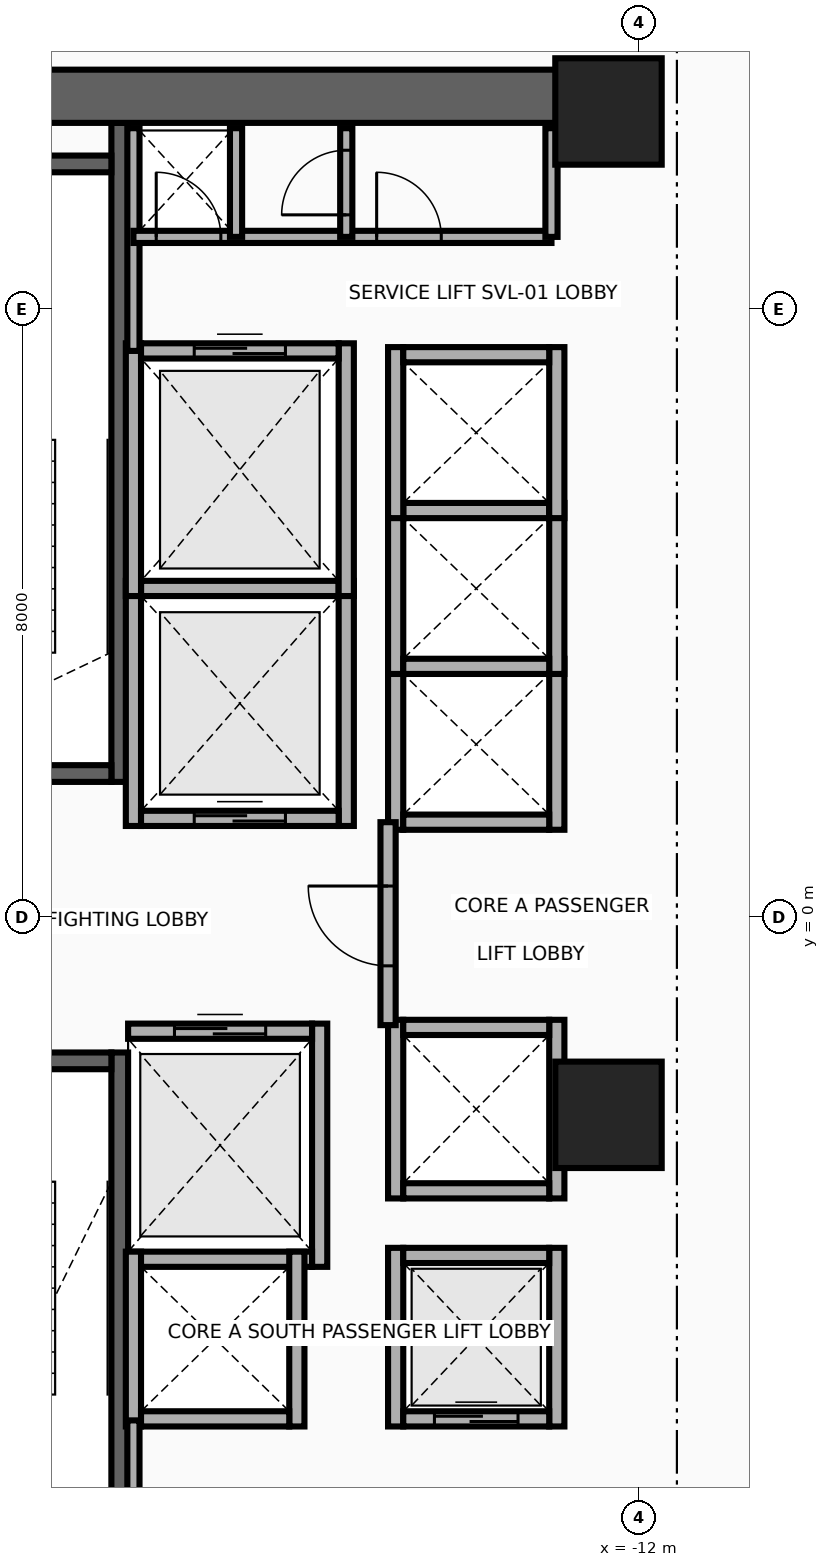
"""IFC4 building model, lengths in metres.
Left out: names, types, materials, properties, quantities, classifications, styles, units other than length and angle.
Written with IfcOpenShell. Run it as: python <this file> out.ifc"""

import sys

from ifc_helpers import new_model, si_unit, direction, frame, frame_2d, origin, origin_2d, place, context, subcontext, project, spatial, rectangle, extrude, source, transform, mapped, element, fill, save


model = new_model("IFC4")
c1 = context("Model", 3, precision=1e-05, world=origin(), true_north=direction((0.0, 1.0)))
c2 = subcontext(c1, "Body", "Model", "MODEL_VIEW")
j1 = project(units=[si_unit("LENGTHUNIT", "METRE"), si_unit("PLANEANGLEUNIT", "RADIAN")], contexts=[c1])
p1 = place(None, origin())
s1 = spatial("IfcSite", under=j1, at=p1, CompositionType="ELEMENT")
p2 = place(p1, origin())
s2 = spatial("IfcBuilding", under=s1, at=p2, CompositionType="ELEMENT")
p3 = place(p2, frame((0.0, 0.0, 74.1)))
s3 = spatial("IfcBuildingStorey", under=s2, at=p3, CompositionType="ELEMENT", Elevation=74.1)
p4 = place(p3, frame((-18.83, 1.78, 0.0), z_axis=(0.0, 0.0, 1.0), x_axis=(0.0, 1.0, 0.0)))
e1 = element("IfcWall", 1, at=p4, inside=s3, PredefinedType="SHEAR", context=c2, shape_type="SweptSolid", body=[
    extrude(rectangle(XDim=8.67, YDim=0.22, at=frame_2d((4.335, 0.0))), origin(), (0.0, 0.0, 1.0), 3.46),
])
p5 = place(p3, frame((-22.05, 1.89, 0.0), z_axis=(0.0, 0.0, 1.0), x_axis=(1.0, 0.0, 0.0)))
e2 = element("IfcWall", 2, at=p5, inside=s3, PredefinedType="SHEAR", context=c2, shape_type="SweptSolid", body=[
    extrude(rectangle(XDim=3.11, YDim=0.22, at=frame_2d((1.555, 0.0))), origin(), (0.0, 0.0, 1.0), 3.46),
])
p6 = place(p5, frame((1.0, 0.0, 0.0)))
e3 = element("IfcOpeningElement", 3, at=p6, cuts=e2, PredefinedType="OPENING", context=c2, shape_type="SweptSolid", body=[
    extrude(rectangle(XDim=1.1, YDim=2.15, at=frame_2d((0.55, 1.075))), frame((0.0, 0.125, 0.0), z_axis=(0.0, -1.0, 0.0), x_axis=(1.0, 0.0, 0.0)), (0.0, 0.0, 1.0), 0.25),
])
p7 = place(p3, frame((-22.05, 9.91, 0.0), z_axis=(0.0, 0.0, 1.0), x_axis=(1.0, 0.0, 0.0)))
e4 = element("IfcWall", 4, at=p7, inside=s3, PredefinedType="SHEAR", context=c2, shape_type="SweptSolid", body=[
    extrude(rectangle(XDim=3.11, YDim=0.22, at=frame_2d((1.555, 0.0))), origin(), (0.0, 0.0, 1.0), 3.46),
])
p8 = place(p3, frame((-18.83, -10.45, 0.0), z_axis=(0.0, 0.0, 1.0), x_axis=(0.0, 1.0, 0.0)))
e5 = element("IfcWall", 5, at=p8, inside=s3, PredefinedType="SHEAR", context=c2, shape_type="SweptSolid", body=[
    extrude(rectangle(XDim=8.67, YDim=0.22, at=frame_2d((4.335, 0.0))), origin(), (0.0, 0.0, 1.0), 3.46),
])
p9 = place(p3, frame((-22.05, -1.89, 0.0), z_axis=(0.0, 0.0, 1.0), x_axis=(1.0, 0.0, 0.0)))
e6 = element("IfcWall", 6, at=p9, inside=s3, PredefinedType="SHEAR", context=c2, shape_type="SweptSolid", body=[
    extrude(rectangle(XDim=3.11, YDim=0.22, at=frame_2d((1.555, 0.0))), origin(), (0.0, 0.0, 1.0), 3.46),
])
p10 = place(p9, frame((1.0, 0.0, 0.0)))
e7 = element("IfcOpeningElement", 7, at=p10, cuts=e6, PredefinedType="OPENING", context=c2, shape_type="SweptSolid", body=[
    extrude(rectangle(XDim=1.1, YDim=2.15, at=frame_2d((0.55, 1.075))), frame((0.0, 0.125, 0.0), z_axis=(0.0, -1.0, 0.0), x_axis=(1.0, 0.0, 0.0)), (0.0, 0.0, 1.0), 0.25),
])
p11 = place(p3, frame((-22.65, 10.8, 0.0), z_axis=(0.0, 0.0, 1.0), x_axis=(1.0, 0.0, 0.0)))
e8 = element("IfcWall", 8, at=p11, inside=s3, PredefinedType="SHEAR", context=c2, shape_type="SweptSolid", body=[
    extrude(rectangle(XDim=10.25, YDim=0.7, at=frame_2d((5.125, 0.0))), origin(), (0.0, 0.0, 1.0), 3.46),
])
m1 = source(origin(), c2, "Body", "SweptSolid", [
    extrude(rectangle(XDim=1.4, YDim=1.4, at=origin_2d()), origin(), (0.0, 0.0, 1.0), 3.7),
])
for number, where, z_axis, x_axis in (
    (9, (-12.4, -2.6, 0.0), (0.0, 0.0, 1.0), (1.0, 0.0, 0.0)),
    (10, (-12.4, 10.6, 0.0), (0.0, 0.0, 1.0), (1.0, 0.0, 0.0)),
):
    element("IfcColumn", number, at=place(p3, frame(where, z_axis=z_axis, x_axis=x_axis)), inside=s3, PredefinedType="COLUMN", context=c2, shape_type="MappedRepresentation", body=[
        mapped(m1, transform((0.0, 0.0, 0.0), x_axis=(1.0, 0.0, 0.0), y_axis=(0.0, 1.0, 0.0), z_axis=(0.0, 0.0, 1.0), scale=1.0)),
    ])
for number, where, z_axis, x_axis in (
    (11, (-18.65, 1.2, 0.0), (0.0, 0.0, 1.0), (0.0, 1.0, 0.0)),
    (12, (-15.85, 1.2, 0.0), (0.0, 0.0, 1.0), (0.0, 1.0, 0.0)),
):
    element("IfcWall", number, at=place(p3, frame(where, z_axis=z_axis, x_axis=x_axis)), inside=s3, PredefinedType="MOVABLE", context=c2, shape_type="SweptSolid", body=[
        extrude(rectangle(XDim=3.225, YDim=0.2, at=frame_2d((1.613, 0.0))), origin(), (0.0, 0.0, 1.0), 3.46),
    ])
p12 = place(p3, frame((-18.55, 1.3, 0.0), z_axis=(0.0, 0.0, 1.0), x_axis=(1.0, 0.0, 0.0)))
e13 = element("IfcWall", 13, at=p12, inside=s3, PredefinedType="MOVABLE", context=c2, shape_type="SweptSolid", body=[
    extrude(rectangle(XDim=2.6, YDim=0.2, at=frame_2d((1.3, 0.0))), origin(), (0.0, 0.0, 1.0), 3.46),
])
p13 = place(p12, frame((0.7, 0.0, 0.0)))
e14 = element("IfcOpeningElement", 14, at=p13, cuts=e13, PredefinedType="OPENING", context=c2, shape_type="SweptSolid", body=[
    extrude(rectangle(XDim=1.2, YDim=2.1, at=frame_2d((0.6, 1.05))), frame((0.0, 0.115, 0.0), z_axis=(0.0, -1.0, 0.0), x_axis=(1.0, 0.0, 0.0)), (0.0, 0.0, 1.0), 0.23),
])
p14 = place(p3, frame((-18.55, 4.325, 0.0), z_axis=(0.0, 0.0, 1.0), x_axis=(1.0, 0.0, 0.0)))
e15 = element("IfcWall", 15, at=p14, inside=s3, PredefinedType="MOVABLE", context=c2, shape_type="SweptSolid", body=[
    extrude(rectangle(XDim=2.6, YDim=0.2, at=frame_2d((1.3, 0.0))), origin(), (0.0, 0.0, 1.0), 3.46),
])
p15 = place(p3, frame((-16.2, -4.6, 0.0), z_axis=(0.0, 0.0, 1.0), x_axis=(0.0, 1.0, 0.0)))
e16 = element("IfcWall", 16, at=p15, inside=s3, PredefinedType="MOVABLE", context=c2, shape_type="SweptSolid", body=[
    extrude(rectangle(XDim=3.2, YDim=0.2, at=frame_2d((1.6, 0.0))), origin(), (0.0, 0.0, 1.0), 3.46),
])
p16 = place(p3, frame((-18.72, -4.5, 0.0), z_axis=(0.0, 0.0, 1.0), x_axis=(1.0, 0.0, 0.0)))
e17 = element("IfcWall", 17, at=p16, inside=s3, PredefinedType="MOVABLE", context=c2, shape_type="SweptSolid", body=[
    extrude(rectangle(XDim=2.42, YDim=0.2, at=frame_2d((1.21, 0.0))), origin(), (0.0, 0.0, 1.0), 3.46),
])
p17 = place(p3, frame((-18.72, -1.5, 0.0), z_axis=(0.0, 0.0, 1.0), x_axis=(1.0, 0.0, 0.0)))
e18 = element("IfcWall", 18, at=p17, inside=s3, PredefinedType="MOVABLE", context=c2, shape_type="SweptSolid", body=[
    extrude(rectangle(XDim=2.42, YDim=0.2, at=frame_2d((1.21, 0.0))), origin(), (0.0, 0.0, 1.0), 3.46),
])
p18 = place(p17, frame((0.61, 0.0, 0.0)))
e19 = element("IfcOpeningElement", 19, at=p18, cuts=e18, PredefinedType="OPENING", context=c2, shape_type="SweptSolid", body=[
    extrude(rectangle(XDim=1.2, YDim=2.1, at=frame_2d((0.6, 1.05))), frame((0.0, 0.115, 0.0), z_axis=(0.0, -1.0, 0.0), x_axis=(1.0, 0.0, 0.0)), (0.0, 0.0, 1.0), 0.23),
])
for number, where, z_axis, x_axis in (
    (20, (-18.65, 4.225, 0.0), (0.0, 0.0, 1.0), (0.0, 1.0, 0.0)),
    (21, (-15.85, 4.225, 0.0), (0.0, 0.0, 1.0), (0.0, 1.0, 0.0)),
):
    element("IfcWall", number, at=place(p3, frame(where, z_axis=z_axis, x_axis=x_axis)), inside=s3, PredefinedType="MOVABLE", context=c2, shape_type="SweptSolid", body=[
        extrude(rectangle(XDim=3.325, YDim=0.2, at=frame_2d((1.663, 0.0))), origin(), (0.0, 0.0, 1.0), 3.46),
    ])
p19 = place(p3, frame((-18.55, 7.45, 0.0), z_axis=(0.0, 0.0, 1.0), x_axis=(1.0, 0.0, 0.0)))
e22 = element("IfcWall", 22, at=p19, inside=s3, PredefinedType="MOVABLE", context=c2, shape_type="SweptSolid", body=[
    extrude(rectangle(XDim=2.6, YDim=0.2, at=frame_2d((1.3, 0.0))), origin(), (0.0, 0.0, 1.0), 3.46),
])
p20 = place(p19, frame((0.7, 0.0, 0.0)))
e23 = element("IfcOpeningElement", 23, at=p20, cuts=e22, PredefinedType="OPENING", context=c2, shape_type="SweptSolid", body=[
    extrude(rectangle(XDim=1.2, YDim=2.1, at=frame_2d((0.6, 1.05))), frame((0.0, 0.115, 0.0), z_axis=(0.0, -1.0, 0.0), x_axis=(1.0, 0.0, 0.0)), (0.0, 0.0, 1.0), 0.23),
])
for number, where, z_axis, x_axis in (
    (24, (-15.2, -6.7, 0.0), (0.0, 0.0, 1.0), (0.0, 1.0, 0.0)),
    (25, (-13.08, -6.7, 0.0), (0.0, 0.0, 1.0), (0.0, 1.0, 0.0)),
):
    element("IfcWall", number, at=place(p3, frame(where, z_axis=z_axis, x_axis=x_axis)), inside=s3, PredefinedType="MOVABLE", context=c2, shape_type="SweptSolid", body=[
        extrude(rectangle(XDim=2.35, YDim=0.2, at=frame_2d((1.175, 0.0))), origin(), (0.0, 0.0, 1.0), 3.46),
    ])
p21 = place(p3, frame((-15.1, -6.6, 0.0), z_axis=(0.0, 0.0, 1.0), x_axis=(1.0, 0.0, 0.0)))
e26 = element("IfcWall", 26, at=p21, inside=s3, PredefinedType="MOVABLE", context=c2, shape_type="SweptSolid", body=[
    extrude(rectangle(XDim=1.92, YDim=0.2, at=frame_2d((0.96, 0.0))), origin(), (0.0, 0.0, 1.0), 3.46),
])
p22 = place(p21, frame((0.41, 0.0, 0.0)))
e27 = element("IfcOpeningElement", 27, at=p22, cuts=e26, PredefinedType="OPENING", context=c2, shape_type="SweptSolid", body=[
    extrude(rectangle(XDim=1.1, YDim=2.1, at=frame_2d((0.55, 1.05))), frame((0.0, 0.115, 0.0), z_axis=(0.0, -1.0, 0.0), x_axis=(1.0, 0.0, 0.0)), (0.0, 0.0, 1.0), 0.23),
])
p23 = place(p3, frame((-15.1, -4.45, 0.0), z_axis=(0.0, 0.0, 1.0), x_axis=(1.0, 0.0, 0.0)))
e28 = element("IfcWall", 28, at=p23, inside=s3, PredefinedType="MOVABLE", context=c2, shape_type="SweptSolid", body=[
    extrude(rectangle(XDim=1.92, YDim=0.2, at=frame_2d((0.96, 0.0))), origin(), (0.0, 0.0, 1.0), 3.46),
])
for number, where, z_axis, x_axis in (
    (29, (-15.2, 1.15, 0.0), (0.0, 0.0, 1.0), (0.0, 1.0, 0.0)),
    (30, (-13.08, 1.15, 0.0), (0.0, 0.0, 1.0), (0.0, 1.0, 0.0)),
):
    element("IfcWall", number, at=place(p3, frame(where, z_axis=z_axis, x_axis=x_axis)), inside=s3, PredefinedType="MOVABLE", context=c2, shape_type="SweptSolid", body=[
        extrude(rectangle(XDim=2.25, YDim=0.2, at=frame_2d((1.125, 0.0))), origin(), (0.0, 0.0, 1.0), 3.46),
    ])
p24 = place(p3, frame((-15.1, 1.25, 0.0), z_axis=(0.0, 0.0, 1.0), x_axis=(1.0, 0.0, 0.0)))
e31 = element("IfcWall", 31, at=p24, inside=s3, PredefinedType="MOVABLE", context=c2, shape_type="SweptSolid", body=[
    extrude(rectangle(XDim=1.92, YDim=0.2, at=frame_2d((0.96, 0.0))), origin(), (0.0, 0.0, 1.0), 3.46),
])
for number, where, z_axis, x_axis in (
    (32, (-15.2, 3.2, 0.0), (0.0, 0.0, 1.0), (0.0, 1.0, 0.0)),
    (33, (-13.08, 3.2, 0.0), (0.0, 0.0, 1.0), (0.0, 1.0, 0.0)),
):
    element("IfcWall", number, at=place(p3, frame(where, z_axis=z_axis, x_axis=x_axis)), inside=s3, PredefinedType="MOVABLE", context=c2, shape_type="SweptSolid", body=[
        extrude(rectangle(XDim=2.25, YDim=0.2, at=frame_2d((1.125, 0.0))), origin(), (0.0, 0.0, 1.0), 3.46),
    ])
for number, where, z_axis, x_axis in (
    (34, (-15.1, 3.3, 0.0), (0.0, 0.0, 1.0), (1.0, 0.0, 0.0)),
    (35, (-15.1, 5.35, 0.0), (0.0, 0.0, 1.0), (1.0, 0.0, 0.0)),
):
    element("IfcWall", number, at=place(p3, frame(where, z_axis=z_axis, x_axis=x_axis)), inside=s3, PredefinedType="MOVABLE", context=c2, shape_type="SweptSolid", body=[
        extrude(rectangle(XDim=1.92, YDim=0.2, at=frame_2d((0.96, 0.0))), origin(), (0.0, 0.0, 1.0), 3.46),
    ])
for number, where, z_axis, x_axis in (
    (36, (-15.2, 5.25, 0.0), (0.0, 0.0, 1.0), (0.0, 1.0, 0.0)),
    (37, (-13.08, 5.25, 0.0), (0.0, 0.0, 1.0), (0.0, 1.0, 0.0)),
):
    element("IfcWall", number, at=place(p3, frame(where, z_axis=z_axis, x_axis=x_axis)), inside=s3, PredefinedType="MOVABLE", context=c2, shape_type="SweptSolid", body=[
        extrude(rectangle(XDim=2.25, YDim=0.2, at=frame_2d((1.125, 0.0))), origin(), (0.0, 0.0, 1.0), 3.46),
    ])
p25 = place(p3, frame((-15.1, 7.4, 0.0), z_axis=(0.0, 0.0, 1.0), x_axis=(1.0, 0.0, 0.0)))
e38 = element("IfcWall", 38, at=p25, inside=s3, PredefinedType="MOVABLE", context=c2, shape_type="SweptSolid", body=[
    extrude(rectangle(XDim=1.92, YDim=0.2, at=frame_2d((0.96, 0.0))), origin(), (0.0, 0.0, 1.0), 3.46),
])
for number, where, z_axis, x_axis in (
    (39, (-18.65, -6.7, 0.0), (0.0, 0.0, 1.0), (0.0, 1.0, 0.0)),
    (40, (-16.5, -6.7, 0.0), (0.0, 0.0, 1.0), (0.0, 1.0, 0.0)),
):
    element("IfcWall", number, at=place(p3, frame(where, z_axis=z_axis, x_axis=x_axis)), inside=s3, PredefinedType="MOVABLE", context=c2, shape_type="SweptSolid", body=[
        extrude(rectangle(XDim=2.3, YDim=0.2, at=frame_2d((1.15, 0.0))), origin(), (0.0, 0.0, 1.0), 3.46),
    ])
p26 = place(p3, frame((-18.55, -6.6, 0.0), z_axis=(0.0, 0.0, 1.0), x_axis=(1.0, 0.0, 0.0)))
e41 = element("IfcWall", 41, at=p26, inside=s3, PredefinedType="MOVABLE", context=c2, shape_type="SweptSolid", body=[
    extrude(rectangle(XDim=1.95, YDim=0.2, at=frame_2d((0.975, 0.0))), origin(), (0.0, 0.0, 1.0), 3.46),
])
for number, where, z_axis, x_axis in (
    (42, (-15.2, -3.7, 0.0), (0.0, 0.0, 1.0), (0.0, 1.0, 0.0)),
    (43, (-13.08, -3.7, 0.0), (0.0, 0.0, 1.0), (0.0, 1.0, 0.0)),
):
    element("IfcWall", number, at=place(p3, frame(where, z_axis=z_axis, x_axis=x_axis)), inside=s3, PredefinedType="MOVABLE", context=c2, shape_type="SweptSolid", body=[
        extrude(rectangle(XDim=2.35, YDim=0.2, at=frame_2d((1.175, 0.0))), origin(), (0.0, 0.0, 1.0), 3.46),
    ])
for number, where, z_axis, x_axis in (
    (44, (-15.1, -3.6, 0.0), (0.0, 0.0, 1.0), (1.0, 0.0, 0.0)),
    (45, (-15.1, -1.45, 0.0), (0.0, 0.0, 1.0), (1.0, 0.0, 0.0)),
):
    element("IfcWall", number, at=place(p3, frame(where, z_axis=z_axis, x_axis=x_axis)), inside=s3, PredefinedType="MOVABLE", context=c2, shape_type="SweptSolid", body=[
        extrude(rectangle(XDim=1.92, YDim=0.2, at=frame_2d((0.96, 0.0))), origin(), (0.0, 0.0, 1.0), 3.46),
    ])
p27 = place(p3, frame((-15.3, -1.42, 0.0), z_axis=(0.0, 0.0, 1.0), x_axis=(0.0, 1.0, 0.0)))
e46 = element("IfcWall", 46, at=p27, inside=s3, PredefinedType="PARTITIONING", context=c2, shape_type="SweptSolid", body=[
    extrude(rectangle(XDim=2.67, YDim=0.2, at=frame_2d((1.335, 0.0))), origin(), (0.0, 0.0, 1.0), 3.46),
])
p28 = place(p27, frame((0.78, 0.0, 0.0)))
e47 = element("IfcOpeningElement", 47, at=p28, cuts=e46, PredefinedType="OPENING", context=c2, shape_type="SweptSolid", body=[
    extrude(rectangle(XDim=1.05, YDim=2.15, at=frame_2d((0.525, 1.075))), frame((0.0, 0.115, 0.0), z_axis=(0.0, -1.0, 0.0), x_axis=(1.0, 0.0, 0.0)), (0.0, 0.0, 1.0), 0.23),
])
p29 = place(p3, frame((-18.65, 7.45, 0.0), z_axis=(0.0, 0.0, 1.0), x_axis=(0.0, 1.0, 0.0)))
e48 = element("IfcWall", 48, at=p29, inside=s3, PredefinedType="PARTITIONING", context=c2, shape_type="SweptSolid", body=[
    extrude(rectangle(XDim=2.93, YDim=0.16, at=frame_2d((1.465, 0.0))), origin(), (0.0, 0.0, 1.0), 3.46),
])
p30 = place(p3, frame((-18.65, -8.18, 0.0), z_axis=(0.0, 0.0, 1.0), x_axis=(0.0, 1.0, 0.0)))
e49 = element("IfcWall", 49, at=p30, inside=s3, PredefinedType="PARTITIONING", context=c2, shape_type="SweptSolid", body=[
    extrude(rectangle(XDim=1.56, YDim=0.16, at=frame_2d((0.78, 0.0))), origin(), (0.0, 0.0, 1.0), 3.46),
])
p31 = place(p3, frame((-18.65, 8.95, 0.0), z_axis=(0.0, 0.0, 1.0), x_axis=(1.0, 0.0, 0.0)))
e50 = element("IfcWall", 50, at=p31, inside=s3, PredefinedType="PARTITIONING", context=c2, shape_type="SweptSolid", body=[
    extrude(rectangle(XDim=5.5, YDim=0.16, at=frame_2d((2.75, 0.0))), origin(), (0.0, 0.0, 1.0), 3.46),
])
p32 = place(p31, frame((0.3, 0.0, 0.0)))
e51 = element("IfcOpeningElement", 51, at=p32, cuts=e50, PredefinedType="OPENING", context=c2, shape_type="SweptSolid", body=[
    extrude(rectangle(XDim=0.85, YDim=2.05, at=frame_2d((0.425, 1.025))), frame((0.0, 0.095, 0.0), z_axis=(0.0, -1.0, 0.0), x_axis=(1.0, 0.0, 0.0)), (0.0, 0.0, 1.0), 0.19),
])
p33 = place(p31, frame((3.2, 0.0, 0.0)))
e52 = element("IfcOpeningElement", 52, at=p33, cuts=e50, PredefinedType="OPENING", context=c2, shape_type="SweptSolid", body=[
    extrude(rectangle(XDim=0.85, YDim=2.05, at=frame_2d((0.425, 1.025))), frame((0.0, 0.095, 0.0), z_axis=(0.0, -1.0, 0.0), x_axis=(1.0, 0.0, 0.0)), (0.0, 0.0, 1.0), 0.19),
])
for number, where, z_axis, x_axis in (
    (53, (-13.15, 8.95, 0.0), (0.0, 0.0, 1.0), (0.0, 1.0, 0.0)),
    (54, (-17.3, 8.95, 0.0), (0.0, 0.0, 1.0), (0.0, 1.0, 0.0)),
):
    element("IfcWall", number, at=place(p3, frame(where, z_axis=z_axis, x_axis=x_axis)), inside=s3, PredefinedType="PARTITIONING", context=c2, shape_type="SweptSolid", body=[
        extrude(rectangle(XDim=1.43, YDim=0.16, at=frame_2d((0.715, 0.0))), origin(), (0.0, 0.0, 1.0), 3.46),
    ])
p34 = place(p3, frame((-15.85, 8.95, 0.0), z_axis=(0.0, 0.0, 1.0), x_axis=(0.0, 1.0, 0.0)))
e55 = element("IfcWall", 55, at=p34, inside=s3, PredefinedType="PARTITIONING", context=c2, shape_type="SweptSolid", body=[
    extrude(rectangle(XDim=1.43, YDim=0.16, at=frame_2d((0.715, 0.0))), origin(), (0.0, 0.0, 1.0), 3.46),
])
p35 = place(p34, frame((0.29, 0.0, 0.0)))
e56 = element("IfcOpeningElement", 56, at=p35, cuts=e55, PredefinedType="OPENING", context=c2, shape_type="SweptSolid", body=[
    extrude(rectangle(XDim=0.85, YDim=2.05, at=frame_2d((0.425, 1.025))), frame((0.0, 0.095, 0.0), z_axis=(0.0, -1.0, 0.0), x_axis=(1.0, 0.0, 0.0)), (0.0, 0.0, 1.0), 0.19),
])
p36 = place(p13, origin())
e57 = element("IfcDoor", 57, at=p36, inside=s3, OperationType="DOUBLE_DOOR_SLIDING", PredefinedType="DOOR", context=c2, shape_type="SweptSolid", body=[
    extrude(rectangle(XDim=1.2, YDim=2.1, at=frame_2d((0.6, 1.05))), frame((0.0, 0.025, 0.0), z_axis=(0.0, -1.0, 0.0), x_axis=(1.0, 0.0, 0.0)), (0.0, 0.0, 1.0), 0.05),
])
fill(e14, e57)
p37 = place(p18, origin())
e58 = element("IfcDoor", 58, at=p37, inside=s3, OperationType="DOUBLE_DOOR_SLIDING", PredefinedType="DOOR", context=c2, shape_type="SweptSolid", body=[
    extrude(rectangle(XDim=1.2, YDim=2.1, at=frame_2d((0.6, 1.05))), frame((0.0, 0.025, 0.0), z_axis=(0.0, -1.0, 0.0), x_axis=(1.0, 0.0, 0.0)), (0.0, 0.0, 1.0), 0.05),
])
fill(e19, e58)
p38 = place(p20, origin())
e59 = element("IfcDoor", 59, at=p38, inside=s3, OperationType="DOUBLE_DOOR_SLIDING", PredefinedType="DOOR", context=c2, shape_type="SweptSolid", body=[
    extrude(rectangle(XDim=1.2, YDim=2.1, at=frame_2d((0.6, 1.05))), frame((0.0, 0.025, 0.0), z_axis=(0.0, -1.0, 0.0), x_axis=(1.0, 0.0, 0.0)), (0.0, 0.0, 1.0), 0.05),
])
fill(e23, e59)
p39 = place(p22, origin())
e60 = element("IfcDoor", 60, at=p39, inside=s3, OperationType="DOUBLE_DOOR_SLIDING", PredefinedType="DOOR", context=c2, shape_type="SweptSolid", body=[
    extrude(rectangle(XDim=1.1, YDim=2.1, at=frame_2d((0.55, 1.05))), frame((0.0, 0.025, 0.0), z_axis=(0.0, -1.0, 0.0), x_axis=(1.0, 0.0, 0.0)), (0.0, 0.0, 1.0), 0.05),
])
fill(e27, e60)
p40 = place(p28, origin())
e61 = element("IfcDoor", 61, at=p40, inside=s3, OperationType="SINGLE_SWING_RIGHT", PredefinedType="DOOR", context=c2, shape_type="SweptSolid", body=[
    extrude(rectangle(XDim=1.05, YDim=2.15, at=frame_2d((0.525, 1.075))), frame((0.0, 0.025, 0.0), z_axis=(0.0, -1.0, 0.0), x_axis=(1.0, 0.0, 0.0)), (0.0, 0.0, 1.0), 0.05),
])
fill(e47, e61)
p41 = place(p32, origin())
e62 = element("IfcDoor", 62, at=p41, inside=s3, OperationType="SINGLE_SWING_LEFT", PredefinedType="DOOR", context=c2, shape_type="SweptSolid", body=[
    extrude(rectangle(XDim=0.85, YDim=2.05, at=frame_2d((0.425, 1.025))), frame((0.0, 0.025, 0.0), z_axis=(0.0, -1.0, 0.0), x_axis=(1.0, 0.0, 0.0)), (0.0, 0.0, 1.0), 0.05),
])
fill(e51, e62)
p42 = place(p33, origin())
e63 = element("IfcDoor", 63, at=p42, inside=s3, OperationType="SINGLE_SWING_RIGHT", PredefinedType="DOOR", context=c2, shape_type="SweptSolid", body=[
    extrude(rectangle(XDim=0.85, YDim=2.05, at=frame_2d((0.425, 1.025))), frame((0.0, 0.025, 0.0), z_axis=(0.0, -1.0, 0.0), x_axis=(1.0, 0.0, 0.0)), (0.0, 0.0, 1.0), 0.05),
])
fill(e52, e63)
p43 = place(p35, origin())
e64 = element("IfcDoor", 64, at=p43, inside=s3, OperationType="SINGLE_SWING_LEFT", PredefinedType="DOOR", context=c2, shape_type="SweptSolid", body=[
    extrude(rectangle(XDim=0.85, YDim=2.05, at=frame_2d((0.425, 1.025))), frame((0.0, 0.025, 0.0), z_axis=(0.0, -1.0, 0.0), x_axis=(1.0, 0.0, 0.0)), (0.0, 0.0, 1.0), 0.05),
])
fill(e56, e64)
save(model, sys.argv[1])
